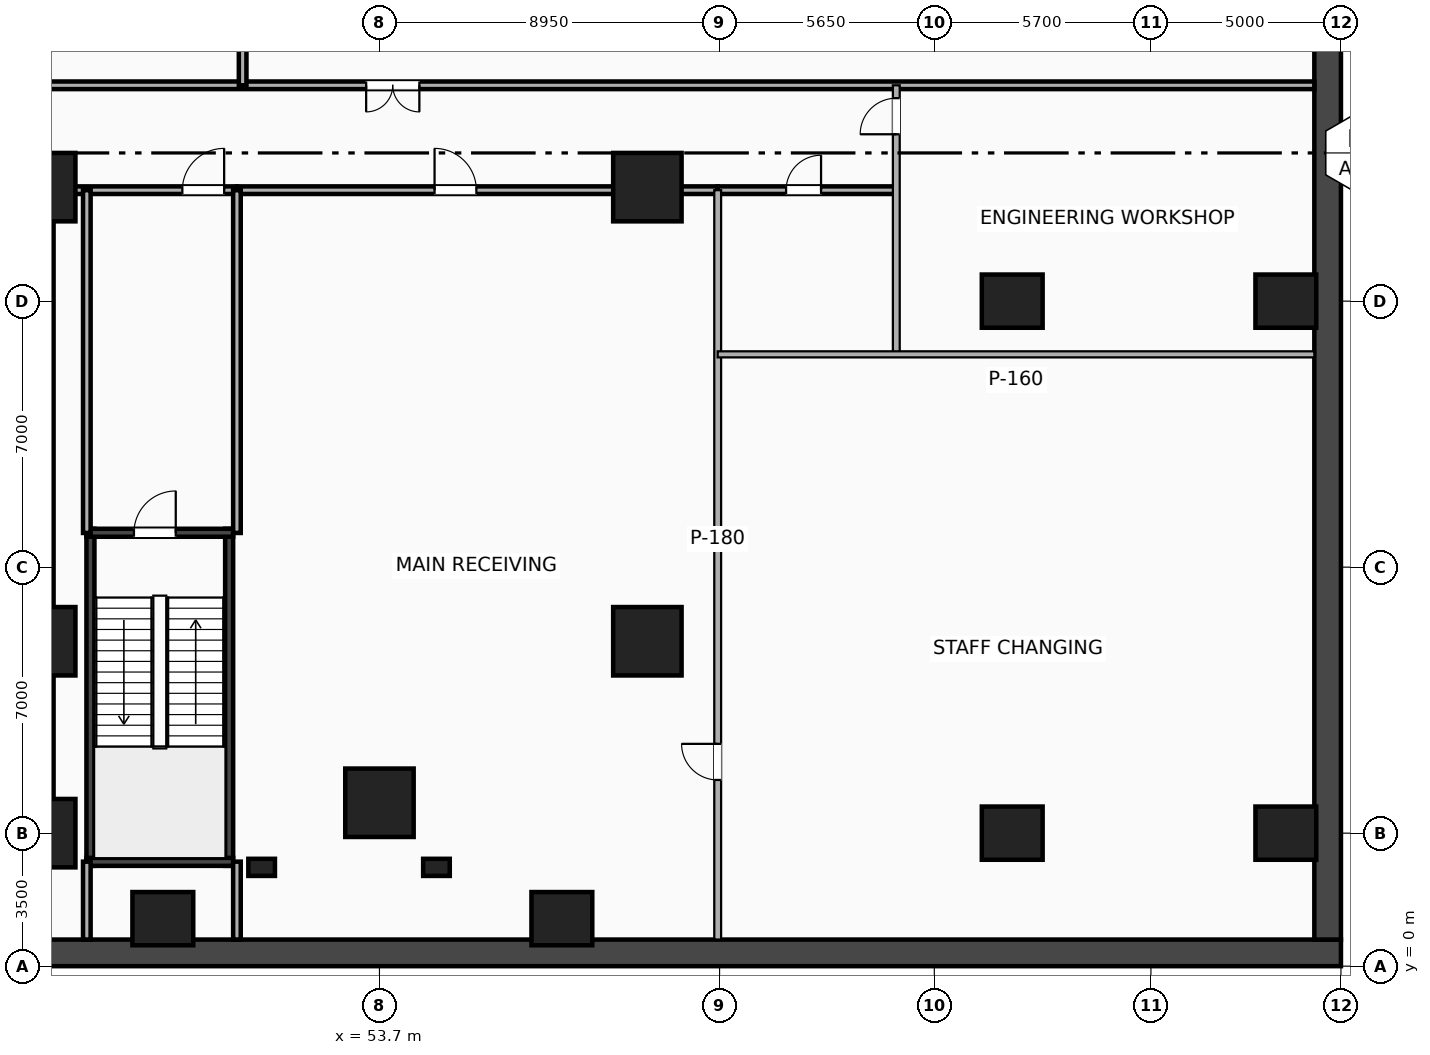
"""IFC4 building model, lengths in metres.
Left out: names, types, materials, properties, quantities, classifications, styles, units other than length and angle.
Written with IfcOpenShell. Run it as: python <this file> out.ifc"""

import sys

from ifc_helpers import new_model, si_unit, direction, frame, frame_2d, origin, origin_2d, place, context, subcontext, project, spatial, rectangle, extrude, element, fill, save


model = new_model("IFC4")
c1 = context("Model", 3, precision=1e-05, world=origin(), true_north=direction((0.0, 1.0)))
c2 = subcontext(c1, "Body", "Model", "MODEL_VIEW")
j1 = project(units=[si_unit("LENGTHUNIT", "METRE"), si_unit("PLANEANGLEUNIT", "RADIAN")], contexts=[c1])
p1 = place(None, origin())
s1 = spatial("IfcSite", under=j1, at=p1, CompositionType="ELEMENT")
p2 = place(p1, origin())
s2 = spatial("IfcBuilding", under=s1, at=p2, CompositionType="ELEMENT")
p3 = place(p2, frame((0.0, 0.0, -5.4)))
s3 = spatial("IfcBuildingStorey", under=s2, at=p3, CompositionType="ELEMENT", Elevation=-5.4)
p4 = place(p3, frame((-5.0, 0.35, 0.0), z_axis=(0.0, 0.0, 1.0), x_axis=(1.0, 0.0, 0.0)))
e1 = element("IfcWall", 1, at=p4, inside=s3, PredefinedType="SOLIDWALL", context=c2, shape_type="SweptSolid", body=[
    extrude(rectangle(XDim=84.0, YDim=0.7, at=frame_2d((42.0, 0.0))), origin(), (0.0, 0.0, 1.0), 5.05),
])
p5 = place(p3, frame((78.65, 0.7, 0.0), z_axis=(0.0, 0.0, 1.0), x_axis=(0.0, 1.0, 0.0)))
e2 = element("IfcWall", 2, at=p5, inside=s3, PredefinedType="SOLIDWALL", context=c2, shape_type="SweptSolid", body=[
    extrude(rectangle(XDim=50.6, YDim=0.7, at=frame_2d((25.3, 0.0))), origin(), (0.0, 0.0, 1.0), 5.05),
])
p6 = place(p3, frame((44.8, 3.5, 0.0), z_axis=(0.0, 0.0, 1.0), x_axis=(0.0, 1.0, 0.0)))
e3 = element("IfcWall", 3, at=p6, inside=s3, PredefinedType="SHEAR", context=c2, shape_type="SweptSolid", body=[
    extrude(rectangle(XDim=16.9, YDim=0.65, at=frame_2d((8.45, 0.0))), origin(), (0.0, 0.0, 1.0), 5.05),
])
for number, where, z_axis, x_axis in (
    (4, (46.095, 2.64, 0.0), (0.0, 0.0, 1.0), (0.0, 1.0, 0.0)),
    (5, (49.745, 2.64, 0.0), (0.0, 0.0, 1.0), (0.0, 1.0, 0.0)),
):
    element("IfcWall", number, at=place(p3, frame(where, z_axis=z_axis, x_axis=x_axis)), inside=s3, PredefinedType="SHEAR", context=c2, shape_type="SweptSolid", body=[
        extrude(rectangle(XDim=8.87, YDim=0.21, at=frame_2d((4.435, 0.0))), origin(), (0.0, 0.0, 1.0), 5.05),
    ])
p7 = place(p3, frame((45.99, 2.745, 0.0), z_axis=(0.0, 0.0, 1.0), x_axis=(1.0, 0.0, 0.0)))
e6 = element("IfcWall", 6, at=p7, inside=s3, PredefinedType="SHEAR", context=c2, shape_type="SweptSolid", body=[
    extrude(rectangle(XDim=3.86, YDim=0.21, at=frame_2d((1.93, 0.0))), origin(), (0.0, 0.0, 1.0), 5.05),
])
p8 = place(p3, frame((45.99, 11.405, 0.0), z_axis=(0.0, 0.0, 1.0), x_axis=(1.0, 0.0, 0.0)))
e7 = element("IfcWall", 7, at=p8, inside=s3, PredefinedType="SHEAR", context=c2, shape_type="SweptSolid", body=[
    extrude(rectangle(XDim=3.86, YDim=0.21, at=frame_2d((1.93, 0.0))), origin(), (0.0, 0.0, 1.0), 5.05),
])
p9 = place(p8, frame((2.35, 0.0, 0.0), z_axis=(0.0, 0.0, 1.0), x_axis=(-1.0, 0.0, 0.0)))
e8 = element("IfcOpeningElement", 8, at=p9, cuts=e7, PredefinedType="OPENING", context=c2, shape_type="SweptSolid", body=[
    extrude(rectangle(XDim=1.1, YDim=2.15, at=frame_2d((0.55, 1.075))), frame((0.0, 0.115, 0.0), z_axis=(0.0, -1.0, 0.0), x_axis=(1.0, 0.0, 0.0)), (0.0, 0.0, 1.0), 0.23),
])
for number, where, z_axis, x_axis in (
    (9, (50.6, 2.6, 0.0), (0.0, 0.0, 1.0), (1.0, 0.0, 0.0)),
    (10, (55.2, 2.6, 0.0), (0.0, 0.0, 1.0), (1.0, 0.0, 0.0)),
):
    element("IfcColumn", number, at=place(p3, frame(where, z_axis=z_axis, x_axis=x_axis)), inside=s3, PredefinedType="PILASTER", context=c2, shape_type="SweptSolid", body=[
        extrude(rectangle(XDim=0.7, YDim=0.45, at=origin_2d()), origin(), (0.0, 0.0, 1.0), 5.05),
    ])
for number, where, z_axis, x_axis in (
    (11, (44.8, 3.5, 0.0), (0.0, 0.0, 1.0), (1.0, 0.0, 0.0)),
    (12, (44.8, 8.55, 0.0), (0.0, 0.0, 1.0), (1.0, 0.0, 0.0)),
    (13, (44.8, 20.5, 0.0), (0.0, 0.0, 1.0), (1.0, 0.0, 0.0)),
    (14, (60.75, 8.55, 0.0), (0.0, 0.0, 1.0), (1.0, 0.0, 0.0)),
    (15, (60.75, 20.5, 0.0), (0.0, 0.0, 1.0), (1.0, 0.0, 0.0)),
    (16, (53.7, 4.3, 0.0), (0.0, 0.0, 1.0), (1.0, 0.0, 0.0)),
):
    element("IfcColumn", number, at=place(p3, frame(where, z_axis=z_axis, x_axis=x_axis)), inside=s3, PredefinedType="COLUMN", context=c2, shape_type="SweptSolid", body=[
        extrude(rectangle(XDim=1.8, YDim=1.8, at=origin_2d()), origin(), (0.0, 0.0, 1.0), 5.05),
    ])
for number, where, z_axis, x_axis in (
    (17, (70.35, 3.5, 0.0), (0.0, 0.0, 1.0), (1.0, 0.0, 0.0)),
    (18, (77.55, 3.5, 0.0), (0.0, 0.0, 1.0), (1.0, 0.0, 0.0)),
    (19, (70.35, 17.5, 0.0), (0.0, 0.0, 1.0), (1.0, 0.0, 0.0)),
    (20, (77.55, 17.5, 0.0), (0.0, 0.0, 1.0), (1.0, 0.0, 0.0)),
    (21, (48.0, 1.25, 0.0), (0.0, 0.0, 1.0), (1.0, 0.0, 0.0)),
    (22, (58.5, 1.25, 0.0), (0.0, 0.0, 1.0), (1.0, 0.0, 0.0)),
):
    element("IfcColumn", number, at=place(p3, frame(where, z_axis=z_axis, x_axis=x_axis)), inside=s3, PredefinedType="COLUMN", context=c2, shape_type="SweptSolid", body=[
        extrude(rectangle(XDim=1.6, YDim=1.4, at=origin_2d()), origin(), (0.0, 0.0, 1.0), 5.05),
    ])
p10 = place(p3, frame((-4.65, 23.18, 0.0), z_axis=(0.0, 0.0, 1.0), x_axis=(1.0, 0.0, 0.0)))
e23 = element("IfcWall", 23, at=p10, inside=s3, PredefinedType="PARTITIONING", context=c2, shape_type="SweptSolid", body=[
    extrude(rectangle(XDim=82.95, YDim=0.2, at=frame_2d((41.475, 0.0))), origin(), (0.0, 0.0, 1.0), 4.18),
])
p11 = place(p10, frame((12.0, 0.0, 0.0)))
e24 = element("IfcOpeningElement", 24, at=p11, cuts=e23, PredefinedType="OPENING", context=c2, shape_type="SweptSolid", body=[
    extrude(rectangle(XDim=1.4, YDim=2.2, at=frame_2d((0.7, 1.1))), frame((0.0, 0.11, 0.0), z_axis=(0.0, -1.0, 0.0), x_axis=(1.0, 0.0, 0.0)), (0.0, 0.0, 1.0), 0.22),
])
p12 = place(p10, frame((38.0, 0.0, 0.0)))
e25 = element("IfcOpeningElement", 25, at=p12, cuts=e23, PredefinedType="OPENING", context=c2, shape_type="SweptSolid", body=[
    extrude(rectangle(XDim=1.4, YDim=2.2, at=frame_2d((0.7, 1.1))), frame((0.0, 0.11, 0.0), z_axis=(0.0, -1.0, 0.0), x_axis=(1.0, 0.0, 0.0)), (0.0, 0.0, 1.0), 0.22),
])
p13 = place(p10, frame((58.0, 0.0, 0.0)))
e26 = element("IfcOpeningElement", 26, at=p13, cuts=e23, PredefinedType="OPENING", context=c2, shape_type="SweptSolid", body=[
    extrude(rectangle(XDim=1.4, YDim=2.2, at=frame_2d((0.7, 1.1))), frame((0.0, 0.11, 0.0), z_axis=(0.0, -1.0, 0.0), x_axis=(1.0, 0.0, 0.0)), (0.0, 0.0, 1.0), 0.22),
])
p14 = place(p3, frame((44.8, 20.42, 0.0), z_axis=(0.0, 0.0, 1.0), x_axis=(1.0, 0.0, 0.0)))
e27 = element("IfcWall", 27, at=p14, inside=s3, PredefinedType="PARTITIONING", context=c2, shape_type="SweptSolid", body=[
    extrude(rectangle(XDim=5.15, YDim=0.2, at=frame_2d((2.575, 0.0))), origin(), (0.0, 0.0, 1.0), 4.114),
])
p15 = place(p14, frame((4.813, 0.0, 0.0), z_axis=(0.0, 0.0, 1.0), x_axis=(-1.0, 0.0, 0.0)))
e28 = element("IfcOpeningElement", 28, at=p15, cuts=e27, PredefinedType="OPENING", context=c2, shape_type="SweptSolid", body=[
    extrude(rectangle(XDim=1.1, YDim=2.15, at=frame_2d((0.55, 1.075))), frame((0.0, 0.11, 0.0), z_axis=(0.0, -1.0, 0.0), x_axis=(1.0, 0.0, 0.0)), (0.0, 0.0, 1.0), 0.22),
])
p16 = place(p3, frame((49.95, 20.42, 0.0), z_axis=(0.0, 0.0, 1.0), x_axis=(1.0, 0.0, 0.0)))
e29 = element("IfcWall", 29, at=p16, inside=s3, PredefinedType="PARTITIONING", context=c2, shape_type="SweptSolid", body=[
    extrude(rectangle(XDim=12.65, YDim=0.2, at=frame_2d((6.325, 0.0))), origin(), (0.0, 0.0, 1.0), 4.114),
])
p17 = place(p16, frame((6.3, 0.0, 0.0), z_axis=(0.0, 0.0, 1.0), x_axis=(-1.0, 0.0, 0.0)))
e30 = element("IfcOpeningElement", 30, at=p17, cuts=e29, PredefinedType="OPENING", context=c2, shape_type="SweptSolid", body=[
    extrude(rectangle(XDim=1.1, YDim=2.15, at=frame_2d((0.55, 1.075))), frame((0.0, 0.11, 0.0), z_axis=(0.0, -1.0, 0.0), x_axis=(1.0, 0.0, 0.0)), (0.0, 0.0, 1.0), 0.22),
])
p18 = place(p3, frame((62.6, 20.42, 0.0), z_axis=(0.0, 0.0, 1.0), x_axis=(1.0, 0.0, 0.0)))
e31 = element("IfcWall", 31, at=p18, inside=s3, PredefinedType="PARTITIONING", context=c2, shape_type="SweptSolid", body=[
    extrude(rectangle(XDim=4.7, YDim=0.2, at=frame_2d((2.35, 0.0))), origin(), (0.0, 0.0, 1.0), 5.05),
])
p19 = place(p18, frame((2.72, 0.0, 0.0), z_axis=(0.0, 0.0, 1.0), x_axis=(-1.0, 0.0, 0.0)))
e32 = element("IfcOpeningElement", 32, at=p19, cuts=e31, PredefinedType="OPENING", context=c2, shape_type="SweptSolid", body=[
    extrude(rectangle(XDim=0.92, YDim=2.08, at=frame_2d((0.46, 1.04))), frame((0.0, 0.11, 0.0), z_axis=(0.0, -1.0, 0.0), x_axis=(1.0, 0.0, 0.0)), (0.0, 0.0, 1.0), 0.22),
])
p20 = place(p3, frame((46.0, 11.4, 0.0), z_axis=(0.0, 0.0, 1.0), x_axis=(0.0, 1.0, 0.0)))
e33 = element("IfcWall", 33, at=p20, inside=s3, PredefinedType="PARTITIONING", context=c2, shape_type="SweptSolid", body=[
    extrude(rectangle(XDim=9.02, YDim=0.2, at=frame_2d((4.51, 0.0))), origin(), (0.0, 0.0, 1.0), 4.114),
])
p21 = place(p3, frame((46.0, 0.7, 0.0), z_axis=(0.0, 0.0, 1.0), x_axis=(0.0, 1.0, 0.0)))
e34 = element("IfcWall", 34, at=p21, inside=s3, PredefinedType="PARTITIONING", context=c2, shape_type="SweptSolid", body=[
    extrude(rectangle(XDim=2.05, YDim=0.2, at=frame_2d((1.025, 0.0))), origin(), (0.0, 0.0, 1.0), 4.114),
])
p22 = place(p3, frame((49.95, 11.4, 0.0), z_axis=(0.0, 0.0, 1.0), x_axis=(0.0, 1.0, 0.0)))
e35 = element("IfcWall", 35, at=p22, inside=s3, PredefinedType="PARTITIONING", context=c2, shape_type="SweptSolid", body=[
    extrude(rectangle(XDim=9.02, YDim=0.2, at=frame_2d((4.51, 0.0))), origin(), (0.0, 0.0, 1.0), 4.114),
])
p23 = place(p3, frame((49.95, 0.7, 0.0), z_axis=(0.0, 0.0, 1.0), x_axis=(0.0, 1.0, 0.0)))
e36 = element("IfcWall", 36, at=p23, inside=s3, PredefinedType="PARTITIONING", context=c2, shape_type="SweptSolid", body=[
    extrude(rectangle(XDim=2.05, YDim=0.2, at=frame_2d((1.025, 0.0))), origin(), (0.0, 0.0, 1.0), 4.114),
])
p24 = place(p3, frame((62.6, 0.7, 0.0), z_axis=(0.0, 0.0, 1.0), x_axis=(0.0, 1.0, 0.0)))
e37 = element("IfcWall", 37, at=p24, inside=s3, PredefinedType="PARTITIONING", context=c2, shape_type="SweptSolid", body=[
    extrude(rectangle(XDim=19.72, YDim=0.18, at=frame_2d((9.86, 0.0))), origin(), (0.0, 0.0, 1.0), 4.114),
])
p25 = place(p24, frame((5.15, 0.0, 0.0), z_axis=(0.0, 0.0, 1.0), x_axis=(-1.0, 0.0, 0.0)))
e38 = element("IfcOpeningElement", 38, at=p25, cuts=e37, PredefinedType="OPENING", context=c2, shape_type="SweptSolid", body=[
    extrude(rectangle(XDim=0.95, YDim=2.15, at=frame_2d((0.475, 1.075))), frame((0.0, 0.1, 0.0), z_axis=(0.0, -1.0, 0.0), x_axis=(1.0, 0.0, 0.0)), (0.0, 0.0, 1.0), 0.2),
])
p26 = place(p3, frame((67.3, 16.1, 0.0), z_axis=(0.0, 0.0, 1.0), x_axis=(0.0, 1.0, 0.0)))
e39 = element("IfcWall", 39, at=p26, inside=s3, PredefinedType="PARTITIONING", context=c2, shape_type="SweptSolid", body=[
    extrude(rectangle(XDim=7.08, YDim=0.18, at=frame_2d((3.54, 0.0))), origin(), (0.0, 0.0, 1.0), 5.05),
])
p27 = place(p26, frame((6.741, 0.0, 0.0), z_axis=(0.0, 0.0, 1.0), x_axis=(-1.0, 0.0, 0.0)))
e40 = element("IfcOpeningElement", 40, at=p27, cuts=e39, PredefinedType="OPENING", context=c2, shape_type="SweptSolid", body=[
    extrude(rectangle(XDim=0.95, YDim=2.15, at=frame_2d((0.475, 1.075))), frame((0.0, 0.1, 0.0), z_axis=(0.0, -1.0, 0.0), x_axis=(1.0, 0.0, 0.0)), (0.0, 0.0, 1.0), 0.2),
])
p28 = place(p3, frame((62.6, 16.1, 0.0), z_axis=(0.0, 0.0, 1.0), x_axis=(1.0, 0.0, 0.0)))
e41 = element("IfcWall", 41, at=p28, inside=s3, PredefinedType="PARTITIONING", context=c2, shape_type="SweptSolid", body=[
    extrude(rectangle(XDim=15.7, YDim=0.16, at=frame_2d((7.85, 0.0))), origin(), (0.0, 0.0, 1.0), 4.18),
])
p29 = place(p3, frame((50.1, 23.18, 0.0), z_axis=(0.0, 0.0, 1.0), x_axis=(0.0, 1.0, 0.0)))
e42 = element("IfcWall", 42, at=p29, inside=s3, PredefinedType="PARTITIONING", context=c2, shape_type="SweptSolid", body=[
    extrude(rectangle(XDim=28.12, YDim=0.2, at=frame_2d((14.06, 0.0))), origin(), (0.0, 0.0, 1.0), 4.114),
])
p30 = place(p9, origin())
e43 = element("IfcDoor", 43, at=p30, inside=s3, OperationType="SINGLE_SWING_RIGHT", PredefinedType="DOOR", context=c2, shape_type="SweptSolid", body=[
    extrude(rectangle(XDim=1.1, YDim=2.15, at=frame_2d((0.55, 1.075))), frame((0.0, 0.025, 0.0), z_axis=(0.0, -1.0, 0.0), x_axis=(1.0, 0.0, 0.0)), (0.0, 0.0, 1.0), 0.05),
])
fill(e8, e43)
p31 = place(p13, origin())
e44 = element("IfcDoor", 44, at=p31, inside=s3, OperationType="DOUBLE_DOOR_SINGLE_SWING", PredefinedType="DOOR", context=c2, shape_type="SweptSolid", body=[
    extrude(rectangle(XDim=1.4, YDim=2.2, at=frame_2d((0.7, 1.1))), frame((0.0, 0.025, 0.0), z_axis=(0.0, -1.0, 0.0), x_axis=(1.0, 0.0, 0.0)), (0.0, 0.0, 1.0), 0.05),
])
fill(e26, e44)
p32 = place(p15, origin())
e45 = element("IfcDoor", 45, at=p32, inside=s3, OperationType="SINGLE_SWING_RIGHT", PredefinedType="DOOR", context=c2, shape_type="SweptSolid", body=[
    extrude(rectangle(XDim=1.1, YDim=2.15, at=frame_2d((0.55, 1.075))), frame((0.0, 0.025, 0.0), z_axis=(0.0, -1.0, 0.0), x_axis=(1.0, 0.0, 0.0)), (0.0, 0.0, 1.0), 0.05),
])
fill(e28, e45)
p33 = place(p17, origin())
e46 = element("IfcDoor", 46, at=p33, inside=s3, OperationType="SINGLE_SWING_LEFT", PredefinedType="DOOR", context=c2, shape_type="SweptSolid", body=[
    extrude(rectangle(XDim=1.1, YDim=2.15, at=frame_2d((0.55, 1.075))), frame((0.0, 0.025, 0.0), z_axis=(0.0, -1.0, 0.0), x_axis=(1.0, 0.0, 0.0)), (0.0, 0.0, 1.0), 0.05),
])
fill(e30, e46)
p34 = place(p19, origin())
e47 = element("IfcDoor", 47, at=p34, inside=s3, OperationType="SINGLE_SWING_RIGHT", PredefinedType="DOOR", context=c2, shape_type="SweptSolid", body=[
    extrude(rectangle(XDim=0.92, YDim=2.08, at=frame_2d((0.46, 1.04))), frame((0.0, 0.025, 0.0), z_axis=(0.0, -1.0, 0.0), x_axis=(1.0, 0.0, 0.0)), (0.0, 0.0, 1.0), 0.05),
])
fill(e32, e47)
p35 = place(p25, origin())
e48 = element("IfcDoor", 48, at=p35, inside=s3, OperationType="SINGLE_SWING_RIGHT", PredefinedType="DOOR", context=c2, shape_type="SweptSolid", body=[
    extrude(rectangle(XDim=0.95, YDim=2.15, at=frame_2d((0.475, 1.075))), frame((0.0, 0.025, 0.0), z_axis=(0.0, -1.0, 0.0), x_axis=(1.0, 0.0, 0.0)), (0.0, 0.0, 1.0), 0.05),
])
fill(e38, e48)
p36 = place(p27, origin())
e49 = element("IfcDoor", 49, at=p36, inside=s3, OperationType="SINGLE_SWING_LEFT", PredefinedType="DOOR", context=c2, shape_type="SweptSolid", body=[
    extrude(rectangle(XDim=0.95, YDim=2.15, at=frame_2d((0.475, 1.075))), frame((0.0, 0.025, 0.0), z_axis=(0.0, -1.0, 0.0), x_axis=(1.0, 0.0, 0.0)), (0.0, 0.0, 1.0), 0.05),
])
fill(e40, e49)
save(model, sys.argv[1])
